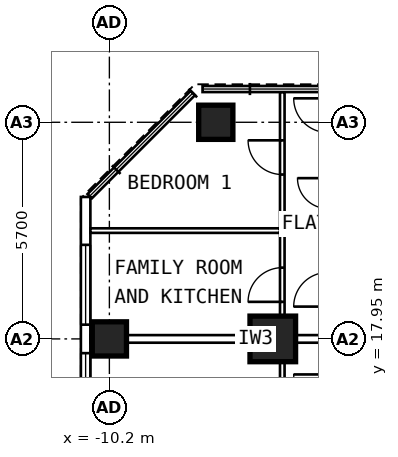
"""IFC4 building model, lengths in metres.
Left out: names, types, materials, properties, quantities, classifications, styles, units other than length and angle.
Written with IfcOpenShell. Run it as: python <this file> out.ifc"""

import sys

from ifc_helpers import new_model, si_unit, direction, frame, frame_2d, origin, origin_2d, place, context, subcontext, project, spatial, rectangle, extrude, element, fill, save


model = new_model("IFC4")
c1 = context("Model", 3, precision=1e-05, world=origin(), true_north=direction((0.0, 1.0)))
c2 = subcontext(c1, "Body", "Model", "MODEL_VIEW")
j1 = project(units=[si_unit("LENGTHUNIT", "METRE"), si_unit("PLANEANGLEUNIT", "RADIAN")], contexts=[c1])
p1 = place(None, origin())
s1 = spatial("IfcSite", under=j1, at=p1, CompositionType="ELEMENT")
p2 = place(p1, origin())
s2 = spatial("IfcBuilding", under=s1, at=p2, CompositionType="ELEMENT")
p3 = place(p2, frame((0.0, 0.0, 176.0)))
s3 = spatial("IfcBuildingStorey", under=s2, at=p3, CompositionType="ELEMENT", Elevation=176.0)
for number, where, z_axis, x_axis in (
    (1, (-10.2, 17.95, 0.0), (0.0, 0.0, 1.0), (0.0, 1.0, 0.0)),
    (2, (-7.4, 23.65, 0.0), (0.0, 0.0, 1.0), (0.0, 1.0, 0.0)),
):
    element("IfcColumn", number, at=place(p3, frame(where, z_axis=z_axis, x_axis=x_axis)), inside=s3, PredefinedType="COLUMN", context=c2, shape_type="SweptSolid", body=[
        extrude(rectangle(XDim=0.9, YDim=0.9, at=origin_2d()), origin(), (0.0, 0.0, 1.0), 3.6),
    ])
p4 = place(p3, frame((-5.9, 17.95, 0.0), z_axis=(0.0, 0.0, 1.0), x_axis=(0.0, 1.0, 0.0)))
e3 = element("IfcColumn", 3, at=p4, inside=s3, PredefinedType="COLUMN", context=c2, shape_type="SweptSolid", body=[
    extrude(rectangle(XDim=1.2, YDim=1.2, at=origin_2d()), origin(), (0.0, 0.0, 1.0), 3.6),
])
p5 = place(p3, frame((-10.825, 6.148, 0.0), z_axis=(0.0, 0.0, 1.0), x_axis=(0.0, 1.0, 0.0)))
e4 = element("IfcWall", 4, at=p5, inside=s3, PredefinedType="SOLIDWALL", context=c2, shape_type="SweptSolid", body=[
    extrude(rectangle(XDim=15.537, YDim=0.25, at=frame_2d((7.769, 0.0))), origin(), (0.0, 0.0, 1.0), 3.35),
])
p6 = place(p5, frame((0.777, 0.0, 0.8)))
e5 = element("IfcOpeningElement", 5, at=p6, cuts=e4, PredefinedType="OPENING", context=c2, shape_type="SweptSolid", body=[
    extrude(rectangle(XDim=2.1, YDim=1.8, at=frame_2d((1.05, 0.9))), frame((0.0, 0.137, 0.0), z_axis=(0.0, -1.0, 0.0), x_axis=(1.0, 0.0, 0.0)), (0.0, 0.0, 1.0), 0.274),
])
p7 = place(p5, frame((3.627, 0.0, 0.8)))
e6 = element("IfcOpeningElement", 6, at=p7, cuts=e4, PredefinedType="OPENING", context=c2, shape_type="SweptSolid", body=[
    extrude(rectangle(XDim=2.1, YDim=1.8, at=frame_2d((1.05, 0.9))), frame((0.0, 0.137, 0.0), z_axis=(0.0, -1.0, 0.0), x_axis=(1.0, 0.0, 0.0)), (0.0, 0.0, 1.0), 0.274),
])
p8 = place(p5, frame((6.477, 0.0, 0.8)))
e7 = element("IfcOpeningElement", 7, at=p8, cuts=e4, PredefinedType="OPENING", context=c2, shape_type="SweptSolid", body=[
    extrude(rectangle(XDim=2.1, YDim=1.8, at=frame_2d((1.05, 0.9))), frame((0.0, 0.137, 0.0), z_axis=(0.0, -1.0, 0.0), x_axis=(1.0, 0.0, 0.0)), (0.0, 0.0, 1.0), 0.274),
])
p9 = place(p5, frame((9.327, 0.0, 0.8)))
e8 = element("IfcOpeningElement", 8, at=p9, cuts=e4, PredefinedType="OPENING", context=c2, shape_type="SweptSolid", body=[
    extrude(rectangle(XDim=2.1, YDim=1.8, at=frame_2d((1.05, 0.9))), frame((0.0, 0.137, 0.0), z_axis=(0.0, -1.0, 0.0), x_axis=(1.0, 0.0, 0.0)), (0.0, 0.0, 1.0), 0.274),
])
p10 = place(p5, frame((12.177, 0.0, 0.8)))
e9 = element("IfcOpeningElement", 9, at=p10, cuts=e4, PredefinedType="OPENING", context=c2, shape_type="SweptSolid", body=[
    extrude(rectangle(XDim=2.1, YDim=1.8, at=frame_2d((1.05, 0.9))), frame((0.0, 0.137, 0.0), z_axis=(0.0, -1.0, 0.0), x_axis=(1.0, 0.0, 0.0)), (0.0, 0.0, 1.0), 0.274),
])
p11 = place(p3, frame((-5.65, 9.6, 0.0), z_axis=(0.0, 0.0, 1.0), x_axis=(0.0, 1.0, 0.0)))
e10 = element("IfcWall", 10, at=p11, inside=s3, PredefinedType="PARTITIONING", context=c2, shape_type="SweptSolid", body=[
    extrude(rectangle(XDim=8.1, YDim=0.12, at=frame_2d((4.05, 0.0))), origin(), (0.0, 0.0, 1.0), 3.35),
])
p12 = place(p11, frame((5.05, 0.0, 0.0)))
e11 = element("IfcOpeningElement", 11, at=p12, cuts=e10, PredefinedType="OPENING", context=c2, shape_type="SweptSolid", body=[
    extrude(rectangle(XDim=0.9, YDim=2.1, at=frame_2d((0.45, 1.05))), frame((0.0, 0.072, 0.0), z_axis=(0.0, -1.0, 0.0), x_axis=(1.0, 0.0, 0.0)), (0.0, 0.0, 1.0), 0.144),
])
p13 = place(p3, frame((-5.65, 18.05, 0.0), z_axis=(0.0, 0.0, 1.0), x_axis=(0.0, 1.0, 0.0)))
e12 = element("IfcWall", 12, at=p13, inside=s3, PredefinedType="PARTITIONING", context=c2, shape_type="SweptSolid", body=[
    extrude(rectangle(XDim=6.395, YDim=0.12, at=frame_2d((3.198, 0.0))), origin(), (0.0, 0.0, 1.0), 3.35),
])
p14 = place(p13, frame((0.875, 0.0, 0.0)))
e13 = element("IfcOpeningElement", 13, at=p14, cuts=e12, PredefinedType="OPENING", context=c2, shape_type="SweptSolid", body=[
    extrude(rectangle(XDim=0.9, YDim=2.1, at=frame_2d((0.45, 1.05))), frame((0.0, 0.072, 0.0), z_axis=(0.0, -1.0, 0.0), x_axis=(1.0, 0.0, 0.0)), (0.0, 0.0, 1.0), 0.144),
])
p15 = place(p13, frame((4.225, 0.0, 0.0)))
e14 = element("IfcOpeningElement", 14, at=p15, cuts=e12, PredefinedType="OPENING", context=c2, shape_type="SweptSolid", body=[
    extrude(rectangle(XDim=0.9, YDim=2.1, at=frame_2d((0.45, 1.05))), frame((0.0, 0.072, 0.0), z_axis=(0.0, -1.0, 0.0), x_axis=(1.0, 0.0, 0.0)), (0.0, 0.0, 1.0), 0.144),
])
p16 = place(p3, frame((-5.71, 20.8, 0.0), z_axis=(0.0, 0.0, 1.0), x_axis=(-1.0, 0.0, 0.0)))
e15 = element("IfcWall", 15, at=p16, inside=s3, PredefinedType="PARTITIONING", context=c2, shape_type="SweptSolid", body=[
    extrude(rectangle(XDim=4.99, YDim=0.12, at=frame_2d((2.495, 0.0))), origin(), (0.0, 0.0, 1.0), 3.35),
])
p17 = place(p3, frame((-2.0, 17.95, 0.0), z_axis=(0.0, 0.0, 1.0), x_axis=(-1.0, 0.0, 0.0)))
e16 = element("IfcWall", 16, at=p17, inside=s3, PredefinedType="PARTITIONING", context=c2, shape_type="SweptSolid", body=[
    extrude(rectangle(XDim=8.7, YDim=0.2, at=frame_2d((4.35, 0.0))), origin(), (0.0, 0.0, 1.0), 2.45),
])
p18 = place(p9, origin())
e17 = element("IfcWindow", 17, at=p18, inside=s3, PartitioningType="SINGLE_PANEL", PredefinedType="WINDOW", context=c2, shape_type="SweptSolid", body=[
    extrude(rectangle(XDim=2.1, YDim=1.8, at=frame_2d((1.05, 0.9))), frame((0.0, 0.03, 0.0), z_axis=(0.0, -1.0, 0.0), x_axis=(1.0, 0.0, 0.0)), (0.0, 0.0, 1.0), 0.06),
])
fill(e8, e17)
p19 = place(p10, origin())
e18 = element("IfcWindow", 18, at=p19, inside=s3, PartitioningType="SINGLE_PANEL", PredefinedType="WINDOW", context=c2, shape_type="SweptSolid", body=[
    extrude(rectangle(XDim=2.1, YDim=1.8, at=frame_2d((1.05, 0.9))), frame((0.0, 0.03, 0.0), z_axis=(0.0, -1.0, 0.0), x_axis=(1.0, 0.0, 0.0)), (0.0, 0.0, 1.0), 0.06),
])
fill(e9, e18)
p20 = place(p14, origin())
e19 = element("IfcDoor", 19, at=p20, inside=s3, OperationType="SINGLE_SWING_LEFT", PredefinedType="DOOR", context=c2, shape_type="SweptSolid", body=[
    extrude(rectangle(XDim=0.9, YDim=2.1, at=frame_2d((0.45, 1.05))), frame((0.0, 0.025, 0.0), z_axis=(0.0, -1.0, 0.0), x_axis=(1.0, 0.0, 0.0)), (0.0, 0.0, 1.0), 0.05),
])
fill(e13, e19)
p21 = place(p15, origin())
e20 = element("IfcDoor", 20, at=p21, inside=s3, OperationType="SINGLE_SWING_RIGHT", PredefinedType="DOOR", context=c2, shape_type="SweptSolid", body=[
    extrude(rectangle(XDim=0.9, YDim=2.1, at=frame_2d((0.45, 1.05))), frame((0.0, 0.025, 0.0), z_axis=(0.0, -1.0, 0.0), x_axis=(1.0, 0.0, 0.0)), (0.0, 0.0, 1.0), 0.05),
])
fill(e14, e20)
save(model, sys.argv[1])
